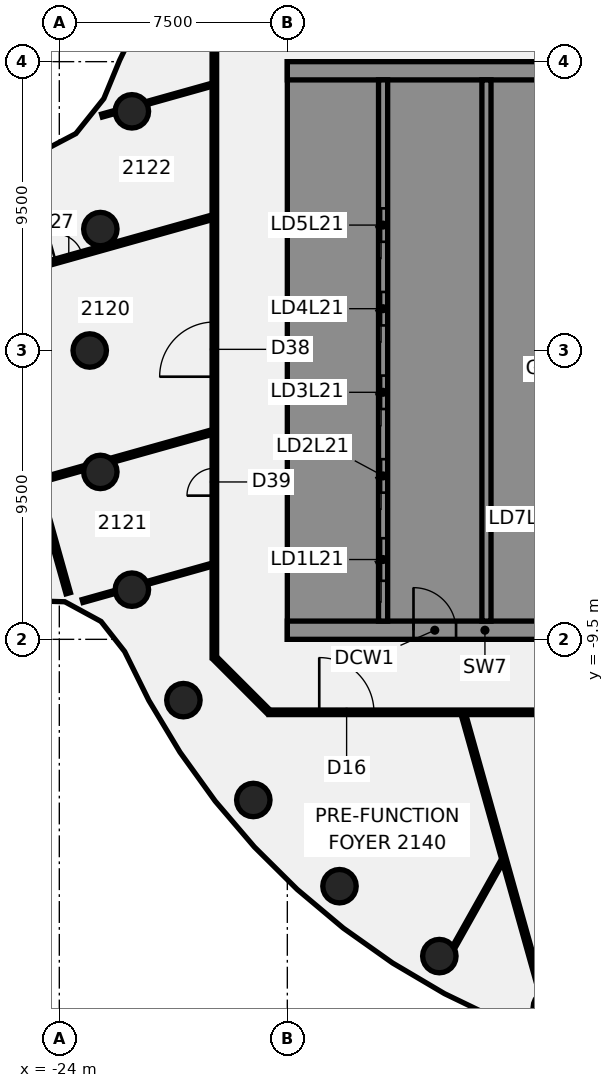
"""IFC4 building model, lengths in metres.
Left out: names, types, materials, properties, quantities, classifications, styles, units other than length and angle.
Written with IfcOpenShell. Run it as: python <this file> out.ifc"""

import sys

from ifc_helpers import new_model, si_unit, direction, frame, frame_2d, origin, origin_2d, place, context, subcontext, project, spatial, polyline, rectangle, circle, outline, extrude, element, fill, save


model = new_model("IFC4")
c1 = context("Model", 3, precision=1e-05, world=origin(), true_north=direction((0.0, 1.0)))
c2 = subcontext(c1, "Body", "Model", "MODEL_VIEW")
j1 = project(units=[si_unit("LENGTHUNIT", "METRE"), si_unit("PLANEANGLEUNIT", "RADIAN")], contexts=[c1])
p1 = place(None, origin())
s1 = spatial("IfcSite", under=j1, at=p1, CompositionType="ELEMENT")
p2 = place(p1, origin())
s2 = spatial("IfcBuilding", under=s1, at=p2, CompositionType="ELEMENT")
p3 = place(p2, frame((0.0, 0.0, 91.0)))
s3 = spatial("IfcBuildingStorey", under=s2, at=p3, CompositionType="ELEMENT", Elevation=91.0)
for number, where, z_axis, x_axis in (
    (1, (-21.613, 7.866, -0.14), (0.0, 0.0, 1.0), (1.0, 0.0, 0.0)),
    (2, (-22.651, 3.994, -0.14), (0.0, 0.0, 1.0), (1.0, 0.0, 0.0)),
    (3, (-23.0, 0.0, -0.14), (0.0, 0.0, 1.0), (1.0, 0.0, 0.0)),
    (4, (-22.651, -3.994, -0.14), (0.0, 0.0, 1.0), (1.0, 0.0, 0.0)),
    (5, (-21.613, -7.866, -0.14), (0.0, 0.0, 1.0), (1.0, 0.0, 0.0)),
    (6, (-19.919, -11.5, -0.14), (0.0, 0.0, 1.0), (1.0, 0.0, 0.0)),
    (7, (-17.619, -14.784, -0.14), (0.0, 0.0, 1.0), (1.0, 0.0, 0.0)),
    (8, (-14.784, -17.619, -0.14), (0.0, 0.0, 1.0), (1.0, 0.0, 0.0)),
    (9, (-11.5, -19.919, -0.14), (0.0, 0.0, 1.0), (1.0, 0.0, 0.0)),
    (10, (-7.866, -21.613, -0.14), (0.0, 0.0, 1.0), (1.0, 0.0, 0.0)),
):
    element("IfcColumn", number, at=place(p3, frame(where, z_axis=z_axis, x_axis=x_axis)), inside=s3, PredefinedType="COLUMN", context=c2, shape_type="SweptSolid", body=[
        extrude(circle(Radius=0.55, at=origin_2d()), origin(), (0.0, 0.0, 1.0), 3.75),
    ])
p4 = place(p3, frame((-27.469, 5.423, 0.0), z_axis=(0.0, 0.0, 1.0), x_axis=(0.270193088423, -0.962806156487, 0.0)))
e11 = element("IfcWall", 11, at=p4, inside=s3, PredefinedType="PARTITIONING", context=c2, shape_type="SweptSolid", body=[
    extrude(rectangle(XDim=13.924, YDim=0.15, at=frame_2d((6.962, 0.0))), origin(), (0.0, 0.0, 1.0), 3.01),
])
p5 = place(p4, frame((5.799, 0.0, 0.0)))
e12 = element("IfcOpeningElement", 12, at=p5, cuts=e11, PredefinedType="OPENING", context=c2, shape_type="SweptSolid", body=[
    extrude(rectangle(XDim=1.4, YDim=2.1, at=frame_2d((0.7, 1.05))), frame((0.0, 0.085, 0.0), z_axis=(0.0, -1.0, 0.0), x_axis=(1.0, 0.0, 0.0)), (0.0, 0.0, 1.0), 0.17),
])
p6 = place(p3, frame((-10.705, -11.977, 0.0), z_axis=(0.0, 0.0, 1.0), x_axis=(0.27008925053, -0.96283529056, 0.0)))
e13 = element("IfcWall", 13, at=p6, inside=s3, PredefinedType="PARTITIONING", context=c2, shape_type="SweptSolid", body=[
    extrude(rectangle(XDim=9.502, YDim=0.15, at=frame_2d((4.751, 0.0))), origin(), (0.0, 0.0, 1.0), 3.01),
])
p7 = place(p3, frame((-18.872, -10.128, 0.0), z_axis=(0.0, 0.0, 1.0), x_axis=(0.707106781187, -0.707106781187, 0.0)))
e14 = element("IfcWall", 14, at=p7, inside=s3, PredefinedType="PARTITIONING", context=c2, shape_type="SweptSolid", body=[
    extrude(rectangle(XDim=2.465, YDim=0.15, at=frame_2d((1.232, 0.0))), origin(), (0.0, 0.0, 1.0), 3.01),
])
p8 = place(p3, frame((-17.1, -11.9, 0.0), z_axis=(0.0, 0.0, 1.0), x_axis=(1.0, 0.0, 0.0)))
e15 = element("IfcWall", 15, at=p8, inside=s3, PredefinedType="PARTITIONING", context=c2, shape_type="SweptSolid", body=[
    extrude(rectangle(XDim=34.165, YDim=0.15, at=frame_2d((17.083, 0.0))), origin(), (0.0, 0.0, 1.0), 3.01),
])
p9 = place(p8, frame((13.435, 0.0, 0.0)))
e16 = element("IfcOpeningElement", 16, at=p9, cuts=e15, PredefinedType="OPENING", context=c2, shape_type="SweptSolid", body=[
    extrude(rectangle(XDim=1.8, YDim=2.1, at=frame_2d((0.9, 1.05))), frame((0.0, 0.085, 0.0), z_axis=(0.0, -1.0, 0.0), x_axis=(1.0, 0.0, 0.0)), (0.0, 0.0, 1.0), 0.17),
])
p10 = place(p8, frame((1.65, 0.0, 0.0)))
e17 = element("IfcOpeningElement", 17, at=p10, cuts=e15, PredefinedType="OPENING", context=c2, shape_type="SweptSolid", body=[
    extrude(rectangle(XDim=1.8, YDim=2.1, at=frame_2d((0.9, 1.05))), frame((0.0, 0.085, 0.0), z_axis=(0.0, -1.0, 0.0), x_axis=(1.0, 0.0, 0.0)), (0.0, 0.0, 1.0), 0.17),
])
p11 = place(p8, frame((27.26, 0.0, 0.0)))
e18 = element("IfcOpeningElement", 18, at=p11, cuts=e15, PredefinedType="OPENING", context=c2, shape_type="SweptSolid", body=[
    extrude(rectangle(XDim=1.8, YDim=2.1, at=frame_2d((0.9, 1.05))), frame((0.0, 0.085, 0.0), z_axis=(0.0, -1.0, 0.0), x_axis=(1.0, 0.0, 0.0)), (0.0, 0.0, 1.0), 0.17),
])
p12 = place(p3, frame((-26.505, 2.267, 0.0), z_axis=(0.0, 0.0, 1.0), x_axis=(0.962822165178, 0.270136036549, 0.0)))
e19 = element("IfcWall", 19, at=p12, inside=s3, PredefinedType="PARTITIONING", context=c2, shape_type="SweptSolid", body=[
    extrude(rectangle(XDim=7.819, YDim=0.15, at=frame_2d((3.909, 0.0))), origin(), (0.0, 0.0, 1.0), 3.01),
])
p13 = place(p12, frame((2.475, 0.0, 0.0)))
e20 = element("IfcOpeningElement", 20, at=p13, cuts=e19, PredefinedType="OPENING", context=c2, shape_type="SweptSolid", body=[
    extrude(rectangle(XDim=0.9, YDim=2.1, at=frame_2d((0.45, 1.05))), frame((0.0, 0.085, 0.0), z_axis=(0.0, -1.0, 0.0), x_axis=(1.0, 0.0, 0.0)), (0.0, 0.0, 1.0), 0.17),
])
p14 = place(p3, frame((-24.668, -4.28, 0.0), z_axis=(0.0, 0.0, 1.0), x_axis=(0.962837976716, 0.270079674529, 0.0)))
e21 = element("IfcWall", 21, at=p14, inside=s3, PredefinedType="PARTITIONING", context=c2, shape_type="SweptSolid", body=[
    extrude(rectangle(XDim=1.55, YDim=0.15, at=frame_2d((0.775, 0.0))), origin(), (0.0, 0.0, 1.0), 3.01),
])
p15 = place(p3, frame((-22.272, -3.608, 0.0), z_axis=(0.0, 0.0, 1.0), x_axis=(0.962845365639, 0.270053331526, 0.0)))
e22 = element("IfcWall", 22, at=p15, inside=s3, PredefinedType="PARTITIONING", context=c2, shape_type="SweptSolid", body=[
    extrude(rectangle(XDim=3.422, YDim=0.15, at=frame_2d((1.711, 0.0))), origin(), (0.0, 0.0, 1.0), 3.01),
])
p16 = place(p3, frame((-23.234, -8.24, 0.0), z_axis=(0.0, 0.0, 1.0), x_axis=(0.962819188594, 0.2701466455, 0.0)))
e23 = element("IfcWall", 23, at=p16, inside=s3, PredefinedType="PARTITIONING", context=c2, shape_type="SweptSolid", body=[
    extrude(rectangle(XDim=1.122, YDim=0.1, at=frame_2d((0.561, 0.0))), origin(), (0.0, 0.0, 1.0), 3.01),
])
p17 = place(p3, frame((-21.112, -7.645, 0.0), z_axis=(0.0, 0.0, 1.0), x_axis=(0.96283500549, 0.270090266769, 0.0)))
e24 = element("IfcWall", 24, at=p17, inside=s3, PredefinedType="PARTITIONING", context=c2, shape_type="SweptSolid", body=[
    extrude(rectangle(XDim=2.223, YDim=0.1, at=frame_2d((1.111, 0.0))), origin(), (0.0, 0.0, 1.0), 3.01),
])
p18 = place(p3, frame((-22.597, 7.727, 0.0), z_axis=(0.0, 0.0, 1.0), x_axis=(0.962855865138, 0.270015893921, 0.0)))
e25 = element("IfcWall", 25, at=p18, inside=s3, PredefinedType="PARTITIONING", context=c2, shape_type="SweptSolid", body=[
    extrude(rectangle(XDim=0.446, YDim=0.1, at=frame_2d((0.223, 0.0))), origin(), (0.0, 0.0, 1.0), 3.01),
])
p19 = place(p3, frame((-21.126, 8.139, 0.0), z_axis=(0.0, 0.0, 1.0), x_axis=(0.962855122656, 0.270018541538, 0.0)))
e26 = element("IfcWall", 26, at=p19, inside=s3, PredefinedType="PARTITIONING", context=c2, shape_type="SweptSolid", body=[
    extrude(rectangle(XDim=2.237, YDim=0.1, at=frame_2d((1.118, 0.0))), origin(), (0.0, 0.0, 1.0), 3.01),
])
p20 = place(p3, frame((-11.027, -19.627, 0.0), z_axis=(0.0, 0.0, 1.0), x_axis=(0.489815478244, 0.871826127891, 0.0)))
e27 = element("IfcWall", 27, at=p20, inside=s3, PredefinedType="PARTITIONING", context=c2, shape_type="SweptSolid", body=[
    extrude(rectangle(XDim=3.225, YDim=0.1, at=frame_2d((1.612, 0.0))), origin(), (0.0, 0.0, 1.0), 3.01),
])
p21 = place(p3, frame((-18.9, -10.1, 0.0), z_axis=(0.0, 0.0, 1.0), x_axis=(0.0, 1.0, 0.0)))
e28 = element("IfcWall", 28, at=p21, inside=s3, PredefinedType="PARTITIONING", context=c2, shape_type="SweptSolid", body=[
    extrude(rectangle(XDim=20.2, YDim=0.15, at=frame_2d((10.1, 0.0))), origin(), (0.0, 0.0, 1.0), 3.01),
])
p22 = place(p21, frame((9.238, 0.0, 0.0)))
e29 = element("IfcOpeningElement", 29, at=p22, cuts=e28, PredefinedType="OPENING", context=c2, shape_type="SweptSolid", body=[
    extrude(rectangle(XDim=1.8, YDim=2.1, at=frame_2d((0.9, 1.05))), frame((0.0, 0.085, 0.0), z_axis=(0.0, -1.0, 0.0), x_axis=(1.0, 0.0, 0.0)), (0.0, 0.0, 1.0), 0.17),
])
p23 = place(p21, frame((5.326, 0.0, 0.0)))
e30 = element("IfcOpeningElement", 30, at=p23, cuts=e28, PredefinedType="OPENING", context=c2, shape_type="SweptSolid", body=[
    extrude(rectangle(XDim=0.9, YDim=2.1, at=frame_2d((0.45, 1.05))), frame((0.0, 0.085, 0.0), z_axis=(0.0, -1.0, 0.0), x_axis=(1.0, 0.0, 0.0)), (0.0, 0.0, 1.0), 0.17),
])
p24 = place(p3, frame((-16.5, -9.2, 0.0), z_axis=(0.0, 0.0, 1.0), x_axis=(1.0, 0.0, 0.0)))
e31 = element("IfcWall", 31, at=p24, inside=s3, PredefinedType="SHEAR", context=c2, shape_type="SweptSolid", body=[
    extrude(rectangle(XDim=13.0, YDim=0.6, at=frame_2d((6.5, 0.0))), origin(), (0.0, 0.0, 1.0), 3.61),
])
p25 = place(p24, frame((4.15, 0.0, 0.0)))
e32 = element("IfcOpeningElement", 32, at=p25, cuts=e31, PredefinedType="OPENING", context=c2, shape_type="SweptSolid", body=[
    extrude(rectangle(XDim=1.4, YDim=2.1, at=frame_2d((0.7, 1.05))), frame((0.0, 0.31, 0.0), z_axis=(0.0, -1.0, 0.0), x_axis=(1.0, 0.0, 0.0)), (0.0, 0.0, 1.0), 0.62),
])
p26 = place(p24, frame((10.125, 0.0, 0.0)))
e33 = element("IfcOpeningElement", 33, at=p26, cuts=e31, PredefinedType="OPENING", context=c2, shape_type="SweptSolid", body=[
    extrude(rectangle(XDim=1.4, YDim=2.1, at=frame_2d((0.7, 1.05))), frame((0.0, 0.31, 0.0), z_axis=(0.0, -1.0, 0.0), x_axis=(1.0, 0.0, 0.0)), (0.0, 0.0, 1.0), 0.62),
])
p27 = place(p3, origin())
e34 = element("IfcWall", 34, at=p27, inside=s3, PredefinedType="SHEAR", context=c2, shape_type="SweptSolid", body=[
    extrude(outline(polyline([(-13.5, -8.9), (-13.5, -8.125), (-15.9, -8.125), (-15.9, -5.625), (-13.5, -5.625), (-13.5, -5.375), (-15.9, -5.375), (-15.9, -2.875), (-13.5, -2.875), (-13.5, -2.625), (-15.9, -2.625), (-15.9, -0.125), (-13.5, -0.125), (-13.5, 0.125), (-15.9, 0.125), (-15.9, 2.625), (-13.5, 2.625), (-13.5, 2.875), (-15.9, 2.875), (-15.9, 5.375), (-13.5, 5.375), (-13.5, 5.625), (-15.9, 5.625), (-15.9, 8.125), (-13.5, 8.125), (-13.5, 8.9), (-15.9, 8.9), (-16.5, 8.9), (-16.5, -8.9), (-15.9, -8.9), (-13.5, -8.9)])), origin(), (0.0, 0.0, 1.0), 3.61),
])
p28 = place(p3, frame((-16.5, 9.2, 0.0), z_axis=(0.0, 0.0, 1.0), x_axis=(1.0, 0.0, 0.0)))
e35 = element("IfcWall", 35, at=p28, inside=s3, PredefinedType="SHEAR", context=c2, shape_type="SweptSolid", body=[
    extrude(rectangle(XDim=13.0, YDim=0.6, at=frame_2d((6.5, 0.0))), origin(), (0.0, 0.0, 1.0), 3.61),
])
p29 = place(p3, origin())
e36 = element("IfcWall", 36, at=p29, inside=s3, PredefinedType="SHEAR", context=c2, shape_type="SweptSolid", body=[
    extrude(outline(polyline([(-9.8, -5.375), (-9.8, -5.625), (-7.5, -5.625), (-7.2, -5.625), (-7.2, 8.9), (-7.5, 8.9), (-9.8, 8.9), (-9.8, 8.125), (-7.5, 8.125), (-7.5, 5.625), (-9.8, 5.625), (-9.8, 5.375), (-7.5, 5.375), (-7.5, 2.875), (-9.8, 2.875), (-9.8, 2.625), (-7.5, 2.625), (-7.5, 0.125), (-9.8, 0.125), (-9.8, -0.125), (-7.5, -0.125), (-7.5, -2.625), (-9.8, -2.625), (-9.8, -2.875), (-7.5, -2.875), (-7.5, -5.375), (-9.8, -5.375)])), origin(), (0.0, 0.0, 1.0), 3.61),
])
p30 = place(p3, origin())
e37 = element("IfcWall", 37, at=p30, inside=s3, PredefinedType="SHEAR", context=c2, shape_type="SweptSolid", body=[
    extrude(outline(polyline([(-7.5, -8.125), (-9.55, -8.125), (-9.55, -5.625), (-9.8, -5.625), (-9.8, -8.125), (-9.8, -8.9), (-7.5, -8.9), (-7.5, -8.125)])), origin(), (0.0, 0.0, 1.0), 3.61),
])
p31 = place(p3, frame((-13.35, -8.9, 0.0), z_axis=(0.0, 0.0, 1.0), x_axis=(0.0, 1.0, 0.0)))
e38 = element("IfcWall", 38, at=p31, inside=s3, PredefinedType="SHEAR", context=c2, shape_type="SweptSolid", body=[
    extrude(rectangle(XDim=17.8, YDim=0.3, at=frame_2d((8.9, 0.0))), origin(), (0.0, 0.0, 1.0), 3.61),
])
p32 = place(p31, frame((1.325, 0.0, 0.0)))
e39 = element("IfcOpeningElement", 39, at=p32, cuts=e38, PredefinedType="OPENING", context=c2, shape_type="SweptSolid", body=[
    extrude(rectangle(XDim=1.4, YDim=2.1, at=frame_2d((0.7, 1.05))), frame((0.0, 0.16, 0.0), z_axis=(0.0, -1.0, 0.0), x_axis=(1.0, 0.0, 0.0)), (0.0, 0.0, 1.0), 0.32),
])
p33 = place(p31, frame((4.225, 0.0, 0.0)))
e40 = element("IfcOpeningElement", 40, at=p33, cuts=e38, PredefinedType="OPENING", context=c2, shape_type="SweptSolid", body=[
    extrude(rectangle(XDim=1.1, YDim=2.1, at=frame_2d((0.55, 1.05))), frame((0.0, 0.16, 0.0), z_axis=(0.0, -1.0, 0.0), x_axis=(1.0, 0.0, 0.0)), (0.0, 0.0, 1.0), 0.32),
])
p34 = place(p31, frame((6.975, 0.0, 0.0)))
e41 = element("IfcOpeningElement", 41, at=p34, cuts=e38, PredefinedType="OPENING", context=c2, shape_type="SweptSolid", body=[
    extrude(rectangle(XDim=1.1, YDim=2.1, at=frame_2d((0.55, 1.05))), frame((0.0, 0.16, 0.0), z_axis=(0.0, -1.0, 0.0), x_axis=(1.0, 0.0, 0.0)), (0.0, 0.0, 1.0), 0.32),
])
p35 = place(p31, frame((9.725, 0.0, 0.0)))
e42 = element("IfcOpeningElement", 42, at=p35, cuts=e38, PredefinedType="OPENING", context=c2, shape_type="SweptSolid", body=[
    extrude(rectangle(XDim=1.1, YDim=2.1, at=frame_2d((0.55, 1.05))), frame((0.0, 0.16, 0.0), z_axis=(0.0, -1.0, 0.0), x_axis=(1.0, 0.0, 0.0)), (0.0, 0.0, 1.0), 0.32),
])
p36 = place(p31, frame((12.475, 0.0, 0.0)))
e43 = element("IfcOpeningElement", 43, at=p36, cuts=e38, PredefinedType="OPENING", context=c2, shape_type="SweptSolid", body=[
    extrude(rectangle(XDim=1.1, YDim=2.1, at=frame_2d((0.55, 1.05))), frame((0.0, 0.16, 0.0), z_axis=(0.0, -1.0, 0.0), x_axis=(1.0, 0.0, 0.0)), (0.0, 0.0, 1.0), 0.32),
])
p37 = place(p3, frame((-9.95, -8.9, 0.0), z_axis=(0.0, 0.0, 1.0), x_axis=(0.0, 1.0, 0.0)))
e44 = element("IfcWall", 44, at=p37, inside=s3, PredefinedType="SHEAR", context=c2, shape_type="SweptSolid", body=[
    extrude(rectangle(XDim=17.8, YDim=0.3, at=frame_2d((8.9, 0.0))), origin(), (0.0, 0.0, 1.0), 3.61),
])
p38 = place(p10, frame((1.8, 0.0, 0.0), z_axis=(0.0, 0.0, 1.0), x_axis=(-1.0, 0.0, 0.0)))
e45 = element("IfcDoor", 45, at=p38, inside=s3, OperationType="DOUBLE_DOOR_SINGLE_SWING", PredefinedType="DOOR", context=c2, shape_type="SweptSolid", body=[
    extrude(rectangle(XDim=1.8, YDim=2.1, at=frame_2d((0.9, 1.05))), frame((0.0, 0.025, 0.0), z_axis=(0.0, -1.0, 0.0), x_axis=(1.0, 0.0, 0.0)), (0.0, 0.0, 1.0), 0.05),
])
fill(e17, e45)
p39 = place(p13, origin())
e46 = element("IfcDoor", 46, at=p39, inside=s3, OperationType="SINGLE_SWING_RIGHT", PredefinedType="DOOR", context=c2, shape_type="SweptSolid", body=[
    extrude(rectangle(XDim=0.9, YDim=2.1, at=frame_2d((0.45, 1.05))), frame((0.0, 0.025, 0.0), z_axis=(0.0, -1.0, 0.0), x_axis=(1.0, 0.0, 0.0)), (0.0, 0.0, 1.0), 0.05),
])
fill(e20, e46)
p40 = place(p22, frame((1.8, 0.0, 0.0), z_axis=(0.0, 0.0, 1.0), x_axis=(-1.0, 0.0, 0.0)))
e47 = element("IfcDoor", 47, at=p40, inside=s3, OperationType="DOUBLE_DOOR_SINGLE_SWING", PredefinedType="DOOR", context=c2, shape_type="SweptSolid", body=[
    extrude(rectangle(XDim=1.8, YDim=2.1, at=frame_2d((0.9, 1.05))), frame((0.0, 0.025, 0.0), z_axis=(0.0, -1.0, 0.0), x_axis=(1.0, 0.0, 0.0)), (0.0, 0.0, 1.0), 0.05),
])
fill(e29, e47)
p41 = place(p23, origin())
e48 = element("IfcDoor", 48, at=p41, inside=s3, OperationType="SINGLE_SWING_RIGHT", PredefinedType="DOOR", context=c2, shape_type="SweptSolid", body=[
    extrude(rectangle(XDim=0.9, YDim=2.1, at=frame_2d((0.45, 1.05))), frame((0.0, 0.025, 0.0), z_axis=(0.0, -1.0, 0.0), x_axis=(1.0, 0.0, 0.0)), (0.0, 0.0, 1.0), 0.05),
])
fill(e30, e48)
p42 = place(p25, origin())
e49 = element("IfcDoor", 49, at=p42, inside=s3, OperationType="SINGLE_SWING_LEFT", PredefinedType="DOOR", context=c2, shape_type="SweptSolid", body=[
    extrude(rectangle(XDim=1.4, YDim=2.1, at=frame_2d((0.7, 1.05))), frame((0.0, 0.025, 0.0), z_axis=(0.0, -1.0, 0.0), x_axis=(1.0, 0.0, 0.0)), (0.0, 0.0, 1.0), 0.05),
])
fill(e32, e49)
p43 = place(p32, origin())
e50 = element("IfcDoor", 50, at=p43, inside=s3, OperationType="SLIDING_TO_LEFT", PredefinedType="DOOR", context=c2, shape_type="SweptSolid", body=[
    extrude(rectangle(XDim=1.4, YDim=2.1, at=frame_2d((0.7, 1.05))), frame((0.0, 0.025, 0.0), z_axis=(0.0, -1.0, 0.0), x_axis=(1.0, 0.0, 0.0)), (0.0, 0.0, 1.0), 0.05),
])
fill(e39, e50)
p44 = place(p33, origin())
e51 = element("IfcDoor", 51, at=p44, inside=s3, OperationType="SLIDING_TO_LEFT", PredefinedType="DOOR", context=c2, shape_type="SweptSolid", body=[
    extrude(rectangle(XDim=1.1, YDim=2.1, at=frame_2d((0.55, 1.05))), frame((0.0, 0.025, 0.0), z_axis=(0.0, -1.0, 0.0), x_axis=(1.0, 0.0, 0.0)), (0.0, 0.0, 1.0), 0.05),
])
fill(e40, e51)
p45 = place(p34, origin())
e52 = element("IfcDoor", 52, at=p45, inside=s3, OperationType="SLIDING_TO_LEFT", PredefinedType="DOOR", context=c2, shape_type="SweptSolid", body=[
    extrude(rectangle(XDim=1.1, YDim=2.1, at=frame_2d((0.55, 1.05))), frame((0.0, 0.025, 0.0), z_axis=(0.0, -1.0, 0.0), x_axis=(1.0, 0.0, 0.0)), (0.0, 0.0, 1.0), 0.05),
])
fill(e41, e52)
p46 = place(p35, origin())
e53 = element("IfcDoor", 53, at=p46, inside=s3, OperationType="SLIDING_TO_LEFT", PredefinedType="DOOR", context=c2, shape_type="SweptSolid", body=[
    extrude(rectangle(XDim=1.1, YDim=2.1, at=frame_2d((0.55, 1.05))), frame((0.0, 0.025, 0.0), z_axis=(0.0, -1.0, 0.0), x_axis=(1.0, 0.0, 0.0)), (0.0, 0.0, 1.0), 0.05),
])
fill(e42, e53)
p47 = place(p36, origin())
e54 = element("IfcDoor", 54, at=p47, inside=s3, OperationType="SLIDING_TO_LEFT", PredefinedType="DOOR", context=c2, shape_type="SweptSolid", body=[
    extrude(rectangle(XDim=1.1, YDim=2.1, at=frame_2d((0.55, 1.05))), frame((0.0, 0.025, 0.0), z_axis=(0.0, -1.0, 0.0), x_axis=(1.0, 0.0, 0.0)), (0.0, 0.0, 1.0), 0.05),
])
fill(e43, e54)
save(model, sys.argv[1])
